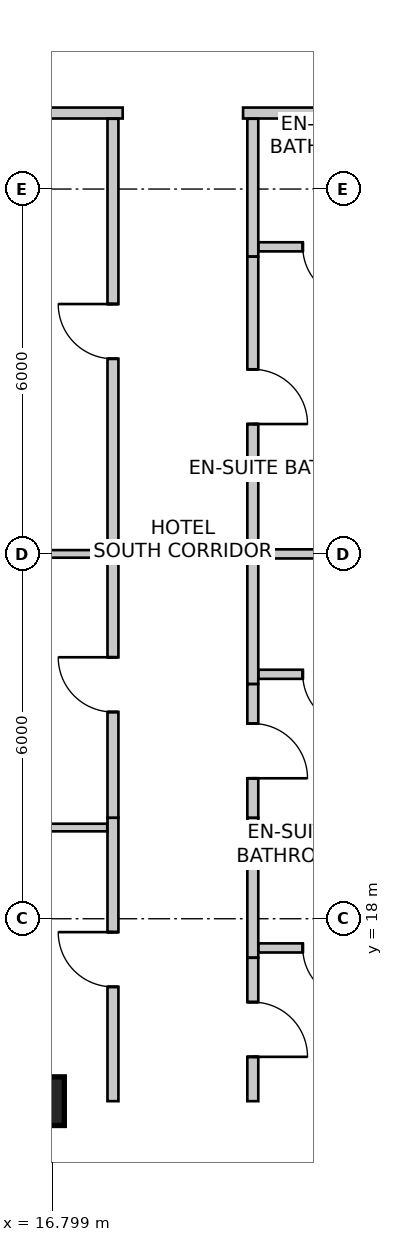
"""IFC4 building model, lengths in metres.
Left out: names, types, materials, properties, quantities, classifications, styles, units other than length and angle.
Written with IfcOpenShell. Run it as: python <this file> out.ifc"""

import sys

from ifc_helpers import new_model, si_unit, direction, frame, frame_2d, origin, origin_2d, place, context, subcontext, project, spatial, rectangle, extrude, source, transform, mapped, element, fill, save


model = new_model("IFC4")
c1 = context("Model", 3, precision=1e-05, world=origin(), true_north=direction((0.0, 1.0)))
c2 = subcontext(c1, "Body", "Model", "MODEL_VIEW")
j1 = project(units=[si_unit("LENGTHUNIT", "METRE"), si_unit("PLANEANGLEUNIT", "RADIAN")], contexts=[c1])
p1 = place(None, origin())
s1 = spatial("IfcSite", under=j1, at=p1, CompositionType="ELEMENT")
p2 = place(p1, origin())
s2 = spatial("IfcBuilding", under=s1, at=p2, CompositionType="ELEMENT")
p3 = place(p2, frame((0.0, 0.0, 128.6)))
s3 = spatial("IfcBuildingStorey", under=s2, at=p3, CompositionType="ELEMENT", Elevation=128.6)
m1 = source(origin(), c2, "Body", "SweptSolid", [
    extrude(rectangle(XDim=0.8, YDim=0.8, at=origin_2d()), origin(), (0.0, 0.0, 1.0), 3.6),
])
p4 = place(p3, frame((16.6, 15.0, 0.0), z_axis=(0.0, 0.0, 1.0), x_axis=(1.0, 0.0, 0.0)))
e1 = element("IfcColumn", 1, at=p4, inside=s3, PredefinedType="COLUMN", context=c2, shape_type="MappedRepresentation", body=[
    mapped(m1, transform((0.0, 0.0, 0.0), scale=1.0)),
])
p5 = place(p3, frame((17.96, 31.25, 0.0), z_axis=(0.0, 0.0, 1.0), x_axis=(-1.0, 0.0, 0.0)))
e2 = element("IfcWall", 2, at=p5, inside=s3, PredefinedType="PARTITIONING", context=c2, shape_type="SweptSolid", body=[
    extrude(rectangle(XDim=5.366, YDim=0.18, at=frame_2d((2.683, 0.0))), origin(), (0.0, 0.0, 1.0), 3.019),
])
p6 = place(p3, frame((22.66, 31.25, 0.0), z_axis=(0.0, 0.0, 1.0), x_axis=(-1.0, 0.0, 0.0)))
e3 = element("IfcWall", 3, at=p6, inside=s3, PredefinedType="PARTITIONING", context=c2, shape_type="SweptSolid", body=[
    extrude(rectangle(XDim=2.72, YDim=0.18, at=frame_2d((1.36, 0.0))), origin(), (0.0, 0.0, 1.0), 3.019),
])
p7 = place(p3, frame((17.8, 15.0, 0.0), z_axis=(0.0, 0.0, 1.0), x_axis=(0.0, 1.0, 0.0)))
e4 = element("IfcWall", 4, at=p7, inside=s3, PredefinedType="PARTITIONING", context=c2, shape_type="SweptSolid", body=[
    extrude(rectangle(XDim=4.66, YDim=0.18, at=frame_2d((2.33, 0.0))), origin(), (0.0, 0.0, 1.0), 2.492),
])
m2 = source(origin(), c2, "Body", "SweptSolid", [
    extrude(rectangle(XDim=0.9, YDim=2.15, at=frame_2d((0.45, 1.075))), frame((0.0, 0.1, 0.0), z_axis=(0.0, -1.0, 0.0), x_axis=(1.0, 0.0, 0.0)), (0.0, 0.0, 1.0), 0.2),
])
p8 = place(p7, frame((1.88, 0.0, 0.0)))
e5 = element("IfcOpeningElement", 5, at=p8, cuts=e4, PredefinedType="OPENING", context=c2, shape_type="MappedRepresentation", body=[
    mapped(m2, transform((0.0, 0.0, 0.0), scale=1.0)),
])
p9 = place(p3, frame((20.1, 19.66, 0.0), z_axis=(0.0, 0.0, 1.0), x_axis=(0.0, -1.0, 0.0)))
e6 = element("IfcWall", 6, at=p9, inside=s3, PredefinedType="PARTITIONING", context=c2, shape_type="SweptSolid", body=[
    extrude(rectangle(XDim=2.3, YDim=0.18, at=frame_2d((1.15, 0.0))), origin(), (0.0, 0.0, 1.0), 3.35),
])
p10 = place(p3, frame((20.1, 17.358, 0.0), z_axis=(0.0, 0.0, 1.0), x_axis=(0.0, -1.0, 0.0)))
e7 = element("IfcWall", 7, at=p10, inside=s3, PredefinedType="PARTITIONING", context=c2, shape_type="SweptSolid", body=[
    extrude(rectangle(XDim=2.358, YDim=0.18, at=frame_2d((1.179, 0.0))), origin(), (0.0, 0.0, 1.0), 2.492),
])
p11 = place(p10, frame((0.729, 0.0, 0.0)))
e8 = element("IfcOpeningElement", 8, at=p11, cuts=e7, PredefinedType="OPENING", context=c2, shape_type="MappedRepresentation", body=[
    mapped(m2, transform((0.0, 0.0, 0.0), scale=1.0)),
])
p12 = place(p3, frame((17.8, 19.662, 0.0), z_axis=(0.0, 0.0, 1.0), x_axis=(0.0, 1.0, 0.0)))
e9 = element("IfcWall", 9, at=p12, inside=s3, PredefinedType="PARTITIONING", context=c2, shape_type="SweptSolid", body=[
    extrude(rectangle(XDim=4.498, YDim=0.18, at=frame_2d((2.249, 0.0))), origin(), (0.0, 0.0, 1.0), 2.803),
])
p13 = place(p12, frame((1.738, 0.0, 0.0)))
e10 = element("IfcOpeningElement", 10, at=p13, cuts=e9, PredefinedType="OPENING", context=c2, shape_type="MappedRepresentation", body=[
    mapped(m2, transform((0.0, 0.0, 0.0), scale=1.0)),
])
p14 = place(p3, frame((20.1, 24.16, 0.0), z_axis=(0.0, 0.0, 1.0), x_axis=(0.0, -1.0, 0.0)))
e11 = element("IfcWall", 11, at=p14, inside=s3, PredefinedType="PARTITIONING", context=c2, shape_type="SweptSolid", body=[
    extrude(rectangle(XDim=2.3, YDim=0.18, at=frame_2d((1.15, 0.0))), origin(), (0.0, 0.0, 1.0), 2.803),
])
p15 = place(p3, frame((20.1, 21.858, 0.0), z_axis=(0.0, 0.0, 1.0), x_axis=(0.0, -1.0, 0.0)))
e12 = element("IfcWall", 12, at=p15, inside=s3, PredefinedType="PARTITIONING", context=c2, shape_type="SweptSolid", body=[
    extrude(rectangle(XDim=2.196, YDim=0.18, at=frame_2d((1.098, 0.0))), origin(), (0.0, 0.0, 1.0), 2.879),
])
p16 = place(p15, frame((0.648, 0.0, 0.0)))
e13 = element("IfcOpeningElement", 13, at=p16, cuts=e12, PredefinedType="OPENING", context=c2, shape_type="MappedRepresentation", body=[
    mapped(m2, transform((0.0, 0.0, 0.0), scale=1.0)),
])
p17 = place(p3, frame((17.8, 24.162, 0.0), z_axis=(0.0, 0.0, 1.0), x_axis=(0.0, 1.0, 0.0)))
e14 = element("IfcWall", 14, at=p17, inside=s3, PredefinedType="PARTITIONING", context=c2, shape_type="SweptSolid", body=[
    extrude(rectangle(XDim=6.994, YDim=0.18, at=frame_2d((3.497, 0.0))), origin(), (0.0, 0.0, 1.0), 2.803),
])
p18 = place(p17, frame((3.047, 0.0, 0.0)))
e15 = element("IfcOpeningElement", 15, at=p18, cuts=e14, PredefinedType="OPENING", context=c2, shape_type="MappedRepresentation", body=[
    mapped(m2, transform((0.0, 0.0, 0.0), scale=1.0)),
])
p19 = place(p3, frame((20.1, 31.156, 0.0), z_axis=(0.0, 0.0, 1.0), x_axis=(0.0, -1.0, 0.0)))
e16 = element("IfcWall", 16, at=p19, inside=s3, PredefinedType="PARTITIONING", context=c2, shape_type="SweptSolid", body=[
    extrude(rectangle(XDim=2.266, YDim=0.18, at=frame_2d((1.133, 0.0))), origin(), (0.0, 0.0, 1.0), 3.019),
])
p20 = place(p3, frame((20.1, 28.888, 0.0), z_axis=(0.0, 0.0, 1.0), x_axis=(0.0, -1.0, 0.0)))
e17 = element("IfcWall", 17, at=p20, inside=s3, PredefinedType="PARTITIONING", context=c2, shape_type="SweptSolid", body=[
    extrude(rectangle(XDim=4.726, YDim=0.18, at=frame_2d((2.363, 0.0))), origin(), (0.0, 0.0, 1.0), 2.803),
])
p21 = place(p20, frame((1.853, 0.0, 0.0)))
e18 = element("IfcOpeningElement", 18, at=p21, cuts=e17, PredefinedType="OPENING", context=c2, shape_type="MappedRepresentation", body=[
    mapped(m2, transform((0.0, 0.0, 0.0), scale=1.0)),
])
p22 = place(p3, frame((13.164, 19.5, 0.0), z_axis=(0.0, 0.0, 1.0), x_axis=(1.0, 0.0, 0.0)))
e19 = element("IfcWall", 19, at=p22, inside=s3, PredefinedType="PARTITIONING", context=c2, shape_type="SweptSolid", body=[
    extrude(rectangle(XDim=4.542, YDim=0.125, at=frame_2d((2.271, 0.0))), origin(), (0.0, 0.0, 1.0), 3.35),
])
p23 = place(p3, frame((22.5, 17.52, 0.0), z_axis=(0.0, 0.0, 1.0), x_axis=(-1.0, 0.0, 0.0)))
e20 = element("IfcWall", 20, at=p23, inside=s3, PredefinedType="PARTITIONING", context=c2, shape_type="SweptSolid", body=[
    extrude(rectangle(XDim=2.306, YDim=0.15, at=frame_2d((1.153, 0.0))), origin(), (0.0, 0.0, 1.0), 2.879),
])
m3 = source(origin(), c2, "Body", "SweptSolid", [
    extrude(rectangle(XDim=0.85, YDim=2.15, at=frame_2d((0.425, 1.075))), frame((0.0, 0.085, 0.0), z_axis=(0.0, -1.0, 0.0), x_axis=(1.0, 0.0, 0.0)), (0.0, 0.0, 1.0), 0.17),
])
p24 = place(p23, frame((0.728, 0.0, 0.0)))
e21 = element("IfcOpeningElement", 21, at=p24, cuts=e20, PredefinedType="OPENING", context=c2, shape_type="MappedRepresentation", body=[
    mapped(m3, transform((0.0, 0.0, 0.0), scale=1.0)),
])
p25 = place(p3, frame((20.194, 19.5, 0.0), z_axis=(0.0, 0.0, 1.0), x_axis=(1.0, 0.0, 0.0)))
e22 = element("IfcWall", 22, at=p25, inside=s3, PredefinedType="PARTITIONING", context=c2, shape_type="SweptSolid", body=[
    extrude(rectangle(XDim=2.227, YDim=0.15, at=frame_2d((1.113, 0.0))), origin(), (0.0, 0.0, 1.0), 3.35),
])
p26 = place(p3, frame((12.295, 24.0, 0.0), z_axis=(0.0, 0.0, 1.0), x_axis=(1.0, 0.0, 0.0)))
e23 = element("IfcWall", 23, at=p26, inside=s3, PredefinedType="PARTITIONING", context=c2, shape_type="SweptSolid", body=[
    extrude(rectangle(XDim=5.411, YDim=0.125, at=frame_2d((2.706, 0.0))), origin(), (0.0, 0.0, 1.0), 2.803),
])
p27 = place(p3, frame((22.5, 22.02, 0.0), z_axis=(0.0, 0.0, 1.0), x_axis=(-1.0, 0.0, 0.0)))
e24 = element("IfcWall", 24, at=p27, inside=s3, PredefinedType="PARTITIONING", context=c2, shape_type="SweptSolid", body=[
    extrude(rectangle(XDim=2.306, YDim=0.15, at=frame_2d((1.153, 0.0))), origin(), (0.0, 0.0, 1.0), 3.35),
])
p28 = place(p27, frame((0.728, 0.0, 0.0)))
e25 = element("IfcOpeningElement", 25, at=p28, cuts=e24, PredefinedType="OPENING", context=c2, shape_type="MappedRepresentation", body=[
    mapped(m3, transform((0.0, 0.0, 0.0), scale=1.0)),
])
p29 = place(p3, frame((20.194, 24.0, 0.0), z_axis=(0.0, 0.0, 1.0), x_axis=(1.0, 0.0, 0.0)))
e26 = element("IfcWall", 26, at=p29, inside=s3, PredefinedType="PARTITIONING", context=c2, shape_type="SweptSolid", body=[
    extrude(rectangle(XDim=2.227, YDim=0.15, at=frame_2d((1.113, 0.0))), origin(), (0.0, 0.0, 1.0), 2.803),
])
p30 = place(p3, frame((22.5, 29.05, 0.0), z_axis=(0.0, 0.0, 1.0), x_axis=(-1.0, 0.0, 0.0)))
e27 = element("IfcWall", 27, at=p30, inside=s3, PredefinedType="PARTITIONING", context=c2, shape_type="SweptSolid", body=[
    extrude(rectangle(XDim=2.306, YDim=0.15, at=frame_2d((1.153, 0.0))), origin(), (0.0, 0.0, 1.0), 3.019),
])
p31 = place(p30, frame((0.728, 0.0, 0.0)))
e28 = element("IfcOpeningElement", 28, at=p31, cuts=e27, PredefinedType="OPENING", context=c2, shape_type="MappedRepresentation", body=[
    mapped(m3, transform((0.0, 0.0, 0.0), scale=1.0)),
])
m4 = source(origin(), c2, "Body", "SweptSolid", [
    extrude(rectangle(XDim=0.9, YDim=2.15, at=frame_2d((0.45, 1.075))), frame((0.0, 0.025, 0.0), z_axis=(0.0, -1.0, 0.0), x_axis=(1.0, 0.0, 0.0)), (0.0, 0.0, 1.0), 0.05),
])
p32 = place(p8, origin())
e29 = element("IfcDoor", 29, at=p32, inside=s3, OperationType="SINGLE_SWING_RIGHT", PredefinedType="DOOR", context=c2, shape_type="MappedRepresentation", body=[
    mapped(m4, transform((0.0, 0.0, 0.0), scale=1.0)),
])
fill(e5, e29)
m5 = source(origin(), c2, "Body", "SweptSolid", [
    extrude(rectangle(XDim=0.85, YDim=2.15, at=frame_2d((0.425, 1.075))), frame((0.0, 0.025, 0.0), z_axis=(0.0, -1.0, 0.0), x_axis=(1.0, 0.0, 0.0)), (0.0, 0.0, 1.0), 0.05),
])
p33 = place(p24, origin())
e30 = element("IfcDoor", 30, at=p33, inside=s3, OperationType="SINGLE_SWING_LEFT", PredefinedType="DOOR", context=c2, shape_type="MappedRepresentation", body=[
    mapped(m5, transform((0.0, 0.0, 0.0), scale=1.0)),
])
fill(e21, e30)
p34 = place(p11, origin())
e31 = element("IfcDoor", 31, at=p34, inside=s3, OperationType="SINGLE_SWING_RIGHT", PredefinedType="DOOR", context=c2, shape_type="MappedRepresentation", body=[
    mapped(m4, transform((0.0, 0.0, 0.0), scale=1.0)),
])
fill(e8, e31)
p35 = place(p13, origin())
e32 = element("IfcDoor", 32, at=p35, inside=s3, OperationType="SINGLE_SWING_RIGHT", PredefinedType="DOOR", context=c2, shape_type="MappedRepresentation", body=[
    mapped(m4, transform((0.0, 0.0, 0.0), scale=1.0)),
])
fill(e10, e32)
p36 = place(p28, origin())
e33 = element("IfcDoor", 33, at=p36, inside=s3, OperationType="SINGLE_SWING_LEFT", PredefinedType="DOOR", context=c2, shape_type="MappedRepresentation", body=[
    mapped(m5, transform((0.0, 0.0, 0.0), scale=1.0)),
])
fill(e25, e33)
p37 = place(p16, origin())
e34 = element("IfcDoor", 34, at=p37, inside=s3, OperationType="SINGLE_SWING_RIGHT", PredefinedType="DOOR", context=c2, shape_type="MappedRepresentation", body=[
    mapped(m4, transform((0.0, 0.0, 0.0), scale=1.0)),
])
fill(e13, e34)
p38 = place(p18, origin())
e35 = element("IfcDoor", 35, at=p38, inside=s3, OperationType="SINGLE_SWING_RIGHT", PredefinedType="DOOR", context=c2, shape_type="MappedRepresentation", body=[
    mapped(m4, transform((0.0, 0.0, 0.0), scale=1.0)),
])
fill(e15, e35)
p39 = place(p31, origin())
e36 = element("IfcDoor", 36, at=p39, inside=s3, OperationType="SINGLE_SWING_LEFT", PredefinedType="DOOR", context=c2, shape_type="MappedRepresentation", body=[
    mapped(m5, transform((0.0, 0.0, 0.0), scale=1.0)),
])
fill(e28, e36)
p40 = place(p21, origin())
e37 = element("IfcDoor", 37, at=p40, inside=s3, OperationType="SINGLE_SWING_RIGHT", PredefinedType="DOOR", context=c2, shape_type="MappedRepresentation", body=[
    mapped(m4, transform((0.0, 0.0, 0.0), scale=1.0)),
])
fill(e18, e37)
save(model, sys.argv[1])
